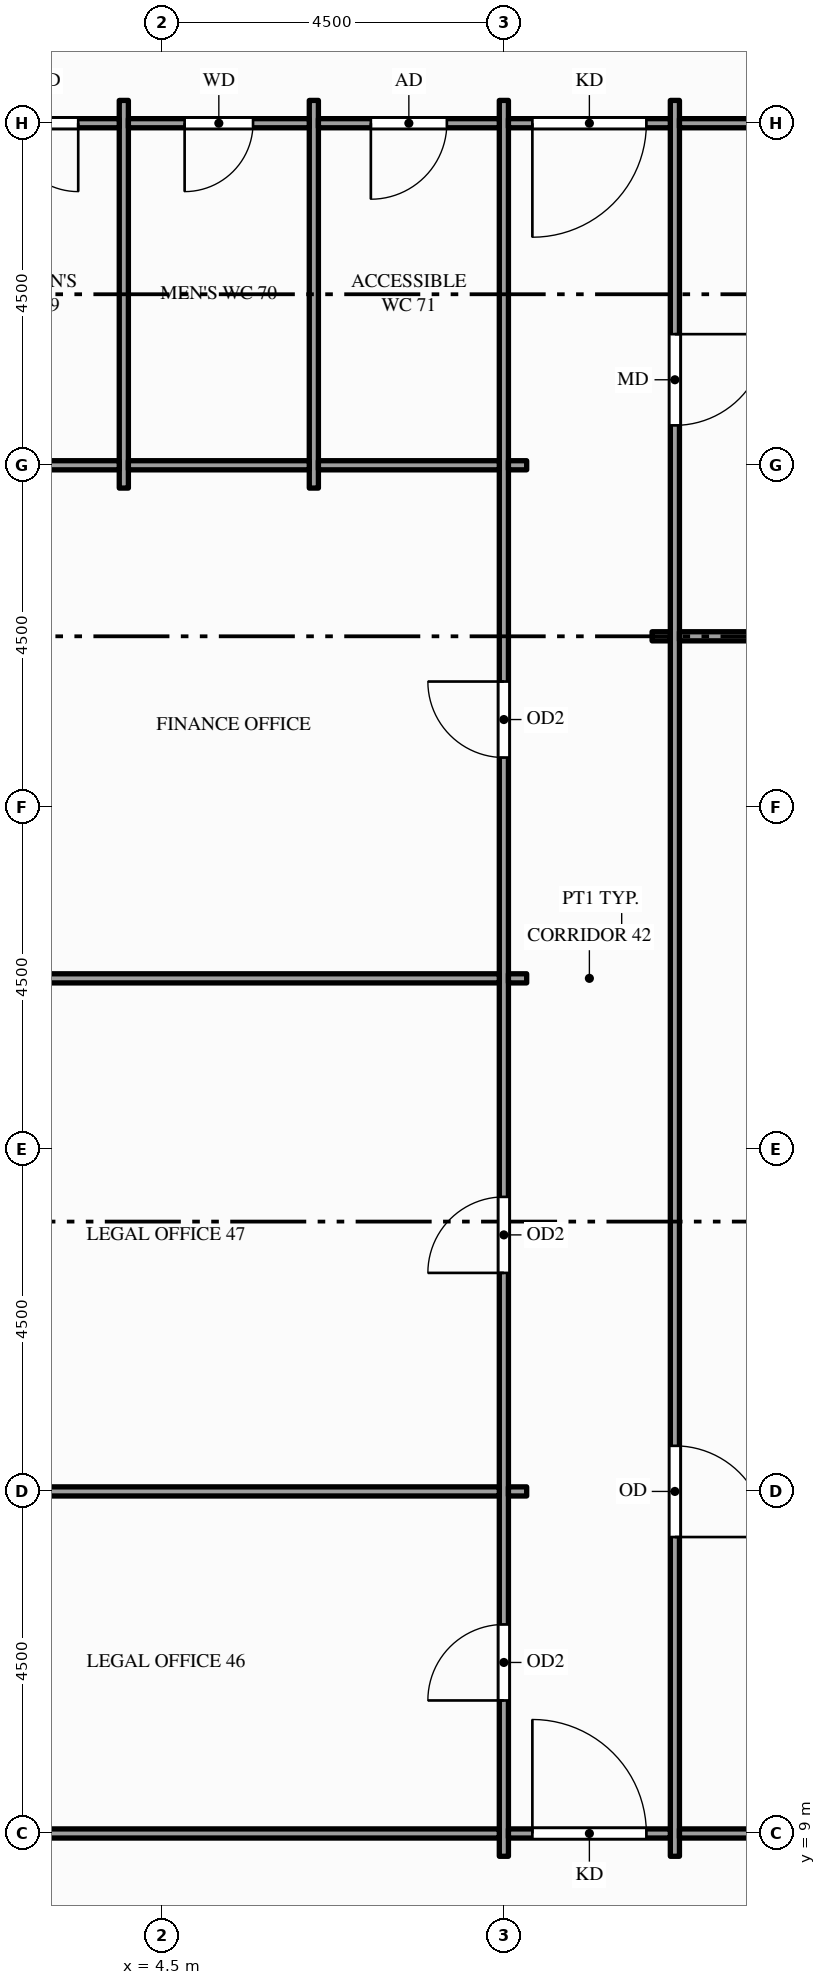
"""IFC4 building model, lengths in metres.
Left out: names, types, materials, properties, quantities, classifications, styles, units other than length and angle.
Written with IfcOpenShell. Run it as: python <this file> out.ifc"""

import sys

from ifc_helpers import new_model, si_unit, direction, frame, frame_2d, origin, place, context, subcontext, project, spatial, rectangle, extrude, element, fill, save


model = new_model("IFC4")
c1 = context("Model", 3, precision=1e-05, world=origin(), true_north=direction((0.0, 1.0)))
c2 = subcontext(c1, "Body", "Model", "MODEL_VIEW")
j1 = project(units=[si_unit("LENGTHUNIT", "METRE"), si_unit("PLANEANGLEUNIT", "RADIAN")], contexts=[c1])
p1 = place(None, origin())
s1 = spatial("IfcSite", under=j1, at=p1, CompositionType="ELEMENT")
p2 = place(p1, origin())
s2 = spatial("IfcBuilding", under=s1, at=p2, CompositionType="ELEMENT")
p3 = place(p2, frame((0.0, 0.0, 215.0)))
s3 = spatial("IfcBuildingStorey", under=s2, at=p3, CompositionType="ELEMENT", Elevation=215.0)
for number, where, z_axis, x_axis in (
    (1, (4.0, 26.7, 0.0), (0.0, 0.0, 1.0), (0.0, 1.0, 0.0)),
    (2, (6.5, 26.7, 0.0), (0.0, 0.0, 1.0), (0.0, 1.0, 0.0)),
):
    element("IfcWall", number, at=place(p3, frame(where, z_axis=z_axis, x_axis=x_axis)), inside=s3, PredefinedType="PARTITIONING", context=c2, shape_type="SweptSolid", body=[
        extrude(rectangle(XDim=5.1, YDim=0.12, at=frame_2d((2.55, 0.0))), origin(), (0.0, 0.0, 1.0), 3.85),
    ])
p4 = place(p3, frame((9.0, 8.7, 0.0), z_axis=(0.0, 0.0, 1.0), x_axis=(0.0, 1.0, 0.0)))
e3 = element("IfcWall", 3, at=p4, inside=s3, PredefinedType="PARTITIONING", context=c2, shape_type="SweptSolid", body=[
    extrude(rectangle(XDim=23.1, YDim=0.12, at=frame_2d((11.55, 0.0))), origin(), (0.0, 0.0, 1.0), 2.6),
])
p5 = place(p4, frame((2.05, 0.0, 0.0)))
e4 = element("IfcOpeningElement", 4, at=p5, cuts=e3, PredefinedType="OPENING", context=c2, shape_type="SweptSolid", body=[
    extrude(rectangle(XDim=1.0, YDim=2.1, at=frame_2d((0.5, 1.05))), frame((0.0, 0.07, 0.0), z_axis=(0.0, -1.0, 0.0), x_axis=(1.0, 0.0, 0.0)), (0.0, 0.0, 1.0), 0.14),
])
p6 = place(p4, frame((7.675, 0.0, 0.0)))
e5 = element("IfcOpeningElement", 5, at=p6, cuts=e3, PredefinedType="OPENING", context=c2, shape_type="SweptSolid", body=[
    extrude(rectangle(XDim=1.0, YDim=2.1, at=frame_2d((0.5, 1.05))), frame((0.0, 0.07, 0.0), z_axis=(0.0, -1.0, 0.0), x_axis=(1.0, 0.0, 0.0)), (0.0, 0.0, 1.0), 0.14),
])
p7 = place(p4, frame((14.455, 0.0, 0.0)))
e6 = element("IfcOpeningElement", 6, at=p7, cuts=e3, PredefinedType="OPENING", context=c2, shape_type="SweptSolid", body=[
    extrude(rectangle(XDim=1.0, YDim=2.1, at=frame_2d((0.5, 1.05))), frame((0.0, 0.07, 0.0), z_axis=(0.0, -1.0, 0.0), x_axis=(1.0, 0.0, 0.0)), (0.0, 0.0, 1.0), 0.14),
])
p8 = place(p3, frame((11.25, 8.7, 0.0), z_axis=(0.0, 0.0, 1.0), x_axis=(0.0, 1.0, 0.0)))
e7 = element("IfcWall", 7, at=p8, inside=s3, PredefinedType="PARTITIONING", context=c2, shape_type="SweptSolid", body=[
    extrude(rectangle(XDim=23.1, YDim=0.12, at=frame_2d((11.55, 0.0))), origin(), (0.0, 0.0, 1.0), 2.6),
])
p9 = place(p8, frame((18.825, 0.0, 0.0)))
e8 = element("IfcOpeningElement", 8, at=p9, cuts=e7, PredefinedType="OPENING", context=c2, shape_type="SweptSolid", body=[
    extrude(rectangle(XDim=1.2, YDim=2.1, at=frame_2d((0.6, 1.05))), frame((0.0, 0.07, 0.0), z_axis=(0.0, -1.0, 0.0), x_axis=(1.0, 0.0, 0.0)), (0.0, 0.0, 1.0), 0.14),
])
p10 = place(p8, frame((4.2, 0.0, 0.0)))
e9 = element("IfcOpeningElement", 9, at=p10, cuts=e7, PredefinedType="OPENING", context=c2, shape_type="SweptSolid", body=[
    extrude(rectangle(XDim=1.2, YDim=2.1, at=frame_2d((0.6, 1.05))), frame((0.0, 0.07, 0.0), z_axis=(0.0, -1.0, 0.0), x_axis=(1.0, 0.0, 0.0)), (0.0, 0.0, 1.0), 0.14),
])
p11 = place(p3, frame((0.15, 9.0, 0.0), z_axis=(0.0, 0.0, 1.0), x_axis=(1.0, 0.0, 0.0)))
e10 = element("IfcWall", 10, at=p11, inside=s3, PredefinedType="PARTITIONING", context=c2, shape_type="SweptSolid", body=[
    extrude(rectangle(XDim=8.79, YDim=0.12, at=frame_2d((4.395, 0.0))), origin(), (0.0, 0.0, 1.0), 2.87),
])
p12 = place(p3, frame((9.06, 9.0, 0.0), z_axis=(0.0, 0.0, 1.0), x_axis=(1.0, 0.0, 0.0)))
e11 = element("IfcWall", 11, at=p12, inside=s3, PredefinedType="PARTITIONING", context=c2, shape_type="SweptSolid", body=[
    extrude(rectangle(XDim=2.13, YDim=0.12, at=frame_2d((1.065, 0.0))), origin(), (0.0, 0.0, 1.0), 2.87),
])
p13 = place(p12, frame((0.315, 0.0, 0.0)))
e12 = element("IfcOpeningElement", 12, at=p13, cuts=e11, PredefinedType="OPENING", context=c2, shape_type="SweptSolid", body=[
    extrude(rectangle(XDim=1.5, YDim=2.1, at=frame_2d((0.75, 1.05))), frame((0.0, 0.07, 0.0), z_axis=(0.0, -1.0, 0.0), x_axis=(1.0, 0.0, 0.0)), (0.0, 0.0, 1.0), 0.14),
])
p14 = place(p3, frame((11.31, 9.0, 0.0), z_axis=(0.0, 0.0, 1.0), x_axis=(1.0, 0.0, 0.0)))
e13 = element("IfcWall", 13, at=p14, inside=s3, PredefinedType="PARTITIONING", context=c2, shape_type="SweptSolid", body=[
    extrude(rectangle(XDim=13.38, YDim=0.12, at=frame_2d((6.69, 0.0))), origin(), (0.0, 0.0, 1.0), 2.76),
])
p15 = place(p14, frame((3.54, 0.0, 0.0)))
e14 = element("IfcOpeningElement", 14, at=p15, cuts=e13, PredefinedType="OPENING", context=c2, shape_type="SweptSolid", body=[
    extrude(rectangle(XDim=1.8, YDim=2.1, at=frame_2d((0.9, 1.05))), frame((0.0, 0.07, 0.0), z_axis=(0.0, -1.0, 0.0), x_axis=(1.0, 0.0, 0.0)), (0.0, 0.0, 1.0), 0.14),
])
p16 = place(p3, frame((0.15, 13.5, 0.0), z_axis=(0.0, 0.0, 1.0), x_axis=(1.0, 0.0, 0.0)))
e15 = element("IfcWall", 15, at=p16, inside=s3, PredefinedType="PARTITIONING", context=c2, shape_type="SweptSolid", body=[
    extrude(rectangle(XDim=8.79, YDim=0.12, at=frame_2d((4.395, 0.0))), origin(), (0.0, 0.0, 1.0), 2.87),
])
p17 = place(p3, frame((9.06, 13.5, 0.0), z_axis=(0.0, 0.0, 1.0), x_axis=(1.0, 0.0, 0.0)))
e16 = element("IfcWall", 16, at=p17, inside=s3, PredefinedType="PARTITIONING", context=c2, shape_type="SweptSolid", body=[
    extrude(rectangle(XDim=0.24, YDim=0.12, at=frame_2d((0.12, 0.0))), origin(), (0.0, 0.0, 1.0), 2.87),
])
p18 = place(p3, frame((0.15, 20.25, 0.0), z_axis=(0.0, 0.0, 1.0), x_axis=(1.0, 0.0, 0.0)))
e17 = element("IfcWall", 17, at=p18, inside=s3, PredefinedType="PARTITIONING", context=c2, shape_type="SweptSolid", body=[
    extrude(rectangle(XDim=8.79, YDim=0.12, at=frame_2d((4.395, 0.0))), origin(), (0.0, 0.0, 1.0), 2.87),
])
for number, where, z_axis, x_axis in (
    (18, (9.06, 20.25, 0.0), (0.0, 0.0, 1.0), (1.0, 0.0, 0.0)),
    (19, (10.95, 24.75, 0.0), (0.0, 0.0, 1.0), (1.0, 0.0, 0.0)),
):
    element("IfcWall", number, at=place(p3, frame(where, z_axis=z_axis, x_axis=x_axis)), inside=s3, PredefinedType="PARTITIONING", context=c2, shape_type="SweptSolid", body=[
        extrude(rectangle(XDim=0.24, YDim=0.12, at=frame_2d((0.12, 0.0))), origin(), (0.0, 0.0, 1.0), 2.87),
    ])
p19 = place(p3, frame((11.31, 24.75, 0.0), z_axis=(0.0, 0.0, 1.0), x_axis=(1.0, 0.0, 0.0)))
e20 = element("IfcWall", 20, at=p19, inside=s3, PredefinedType="PARTITIONING", context=c2, shape_type="SweptSolid", body=[
    extrude(rectangle(XDim=12.637, YDim=0.12, at=frame_2d((6.319, 0.0))), origin(), (0.0, 0.0, 1.0), 2.87),
])
p20 = place(p3, frame((1.65, 27.0, 0.0), z_axis=(0.0, 0.0, 1.0), x_axis=(1.0, 0.0, 0.0)))
e21 = element("IfcWall", 21, at=p20, inside=s3, PredefinedType="PARTITIONING", context=c2, shape_type="SweptSolid", body=[
    extrude(rectangle(XDim=2.29, YDim=0.12, at=frame_2d((1.145, 0.0))), origin(), (0.0, 0.0, 1.0), 2.87),
])
for number, where, z_axis, x_axis in (
    (22, (4.06, 27.0, 0.0), (0.0, 0.0, 1.0), (1.0, 0.0, 0.0)),
    (23, (6.56, 27.0, 0.0), (0.0, 0.0, 1.0), (1.0, 0.0, 0.0)),
):
    element("IfcWall", number, at=place(p3, frame(where, z_axis=z_axis, x_axis=x_axis)), inside=s3, PredefinedType="PARTITIONING", context=c2, shape_type="SweptSolid", body=[
        extrude(rectangle(XDim=2.38, YDim=0.12, at=frame_2d((1.19, 0.0))), origin(), (0.0, 0.0, 1.0), 2.87),
    ])
p21 = place(p3, frame((9.06, 27.0, 0.0), z_axis=(0.0, 0.0, 1.0), x_axis=(1.0, 0.0, 0.0)))
e24 = element("IfcWall", 24, at=p21, inside=s3, PredefinedType="PARTITIONING", context=c2, shape_type="SweptSolid", body=[
    extrude(rectangle(XDim=0.24, YDim=0.12, at=frame_2d((0.12, 0.0))), origin(), (0.0, 0.0, 1.0), 2.87),
])
p22 = place(p3, frame((1.65, 31.5, 0.0), z_axis=(0.0, 0.0, 1.0), x_axis=(1.0, 0.0, 0.0)))
e25 = element("IfcWall", 25, at=p22, inside=s3, PredefinedType="PARTITIONING", context=c2, shape_type="SweptSolid", body=[
    extrude(rectangle(XDim=2.29, YDim=0.12, at=frame_2d((1.145, 0.0))), origin(), (0.0, 0.0, 1.0), 2.87),
])
p23 = place(p22, frame((0.85, 0.0, 0.0)))
e26 = element("IfcOpeningElement", 26, at=p23, cuts=e25, PredefinedType="OPENING", context=c2, shape_type="SweptSolid", body=[
    extrude(rectangle(XDim=0.9, YDim=2.1, at=frame_2d((0.45, 1.05))), frame((0.0, 0.07, 0.0), z_axis=(0.0, -1.0, 0.0), x_axis=(1.0, 0.0, 0.0)), (0.0, 0.0, 1.0), 0.14),
])
p24 = place(p3, frame((4.06, 31.5, 0.0), z_axis=(0.0, 0.0, 1.0), x_axis=(1.0, 0.0, 0.0)))
e27 = element("IfcWall", 27, at=p24, inside=s3, PredefinedType="PARTITIONING", context=c2, shape_type="SweptSolid", body=[
    extrude(rectangle(XDim=2.38, YDim=0.12, at=frame_2d((1.19, 0.0))), origin(), (0.0, 0.0, 1.0), 2.87),
])
p25 = place(p24, frame((0.74, 0.0, 0.0)))
e28 = element("IfcOpeningElement", 28, at=p25, cuts=e27, PredefinedType="OPENING", context=c2, shape_type="SweptSolid", body=[
    extrude(rectangle(XDim=0.9, YDim=2.1, at=frame_2d((0.45, 1.05))), frame((0.0, 0.07, 0.0), z_axis=(0.0, -1.0, 0.0), x_axis=(1.0, 0.0, 0.0)), (0.0, 0.0, 1.0), 0.14),
])
p26 = place(p3, frame((6.56, 31.5, 0.0), z_axis=(0.0, 0.0, 1.0), x_axis=(1.0, 0.0, 0.0)))
e29 = element("IfcWall", 29, at=p26, inside=s3, PredefinedType="PARTITIONING", context=c2, shape_type="SweptSolid", body=[
    extrude(rectangle(XDim=2.38, YDim=0.12, at=frame_2d((1.19, 0.0))), origin(), (0.0, 0.0, 1.0), 2.87),
])
p27 = place(p26, frame((0.69, 0.0, 0.0)))
e30 = element("IfcOpeningElement", 30, at=p27, cuts=e29, PredefinedType="OPENING", context=c2, shape_type="SweptSolid", body=[
    extrude(rectangle(XDim=1.0, YDim=2.1, at=frame_2d((0.5, 1.05))), frame((0.0, 0.07, 0.0), z_axis=(0.0, -1.0, 0.0), x_axis=(1.0, 0.0, 0.0)), (0.0, 0.0, 1.0), 0.14),
])
p28 = place(p3, frame((9.06, 31.5, 0.0), z_axis=(0.0, 0.0, 1.0), x_axis=(1.0, 0.0, 0.0)))
e31 = element("IfcWall", 31, at=p28, inside=s3, PredefinedType="PARTITIONING", context=c2, shape_type="SweptSolid", body=[
    extrude(rectangle(XDim=2.13, YDim=0.12, at=frame_2d((1.065, 0.0))), origin(), (0.0, 0.0, 1.0), 2.87),
])
p29 = place(p28, frame((0.315, 0.0, 0.0)))
e32 = element("IfcOpeningElement", 32, at=p29, cuts=e31, PredefinedType="OPENING", context=c2, shape_type="SweptSolid", body=[
    extrude(rectangle(XDim=1.5, YDim=2.1, at=frame_2d((0.75, 1.05))), frame((0.0, 0.07, 0.0), z_axis=(0.0, -1.0, 0.0), x_axis=(1.0, 0.0, 0.0)), (0.0, 0.0, 1.0), 0.14),
])
p30 = place(p3, frame((11.31, 31.5, 0.0), z_axis=(0.0, 0.0, 1.0), x_axis=(1.0, 0.0, 0.0)))
e33 = element("IfcWall", 33, at=p30, inside=s3, PredefinedType="PARTITIONING", context=c2, shape_type="SweptSolid", body=[
    extrude(rectangle(XDim=12.54, YDim=0.12, at=frame_2d((6.27, 0.0))), origin(), (0.0, 0.0, 1.0), 2.87),
])
p31 = place(p13, origin())
e34 = element("IfcDoor", 34, at=p31, inside=s3, OperationType="SINGLE_SWING_LEFT", PredefinedType="DOOR", context=c2, shape_type="SweptSolid", body=[
    extrude(rectangle(XDim=1.5, YDim=2.1, at=frame_2d((0.75, 1.05))), frame((0.0, 0.025, 0.0), z_axis=(0.0, -1.0, 0.0), x_axis=(1.0, 0.0, 0.0)), (0.0, 0.0, 1.0), 0.05),
])
fill(e12, e34)
p32 = place(p29, origin())
e35 = element("IfcDoor", 35, at=p32, inside=s3, OperationType="SINGLE_SWING_LEFT", PredefinedType="DOOR", context=c2, shape_type="SweptSolid", body=[
    extrude(rectangle(XDim=1.5, YDim=2.1, at=frame_2d((0.75, 1.05))), frame((0.0, 0.025, 0.0), z_axis=(0.0, -1.0, 0.0), x_axis=(1.0, 0.0, 0.0)), (0.0, 0.0, 1.0), 0.05),
])
fill(e32, e35)
p33 = place(p5, origin())
e36 = element("IfcDoor", 36, at=p33, inside=s3, OperationType="SINGLE_SWING_LEFT", PredefinedType="DOOR", context=c2, shape_type="SweptSolid", body=[
    extrude(rectangle(XDim=1.0, YDim=2.1, at=frame_2d((0.5, 1.05))), frame((0.0, 0.025, 0.0), z_axis=(0.0, -1.0, 0.0), x_axis=(1.0, 0.0, 0.0)), (0.0, 0.0, 1.0), 0.05),
])
fill(e4, e36)
p34 = place(p6, origin())
e37 = element("IfcDoor", 37, at=p34, inside=s3, OperationType="SINGLE_SWING_LEFT", PredefinedType="DOOR", context=c2, shape_type="SweptSolid", body=[
    extrude(rectangle(XDim=1.0, YDim=2.1, at=frame_2d((0.5, 1.05))), frame((0.0, 0.025, 0.0), z_axis=(0.0, -1.0, 0.0), x_axis=(1.0, 0.0, 0.0)), (0.0, 0.0, 1.0), 0.05),
])
fill(e5, e37)
p35 = place(p7, origin())
e38 = element("IfcDoor", 38, at=p35, inside=s3, OperationType="SINGLE_SWING_RIGHT", PredefinedType="DOOR", context=c2, shape_type="SweptSolid", body=[
    extrude(rectangle(XDim=1.0, YDim=2.1, at=frame_2d((0.5, 1.05))), frame((0.0, 0.025, 0.0), z_axis=(0.0, -1.0, 0.0), x_axis=(1.0, 0.0, 0.0)), (0.0, 0.0, 1.0), 0.05),
])
fill(e6, e38)
p36 = place(p23, origin())
e39 = element("IfcDoor", 39, at=p36, inside=s3, OperationType="SINGLE_SWING_RIGHT", PredefinedType="DOOR", context=c2, shape_type="SweptSolid", body=[
    extrude(rectangle(XDim=0.9, YDim=2.1, at=frame_2d((0.45, 1.05))), frame((0.0, 0.025, 0.0), z_axis=(0.0, -1.0, 0.0), x_axis=(1.0, 0.0, 0.0)), (0.0, 0.0, 1.0), 0.05),
])
fill(e26, e39)
p37 = place(p25, origin())
e40 = element("IfcDoor", 40, at=p37, inside=s3, OperationType="SINGLE_SWING_LEFT", PredefinedType="DOOR", context=c2, shape_type="SweptSolid", body=[
    extrude(rectangle(XDim=0.9, YDim=2.1, at=frame_2d((0.45, 1.05))), frame((0.0, 0.025, 0.0), z_axis=(0.0, -1.0, 0.0), x_axis=(1.0, 0.0, 0.0)), (0.0, 0.0, 1.0), 0.05),
])
fill(e28, e40)
p38 = place(p27, origin())
e41 = element("IfcDoor", 41, at=p38, inside=s3, OperationType="SINGLE_SWING_LEFT", PredefinedType="DOOR", context=c2, shape_type="SweptSolid", body=[
    extrude(rectangle(XDim=1.0, YDim=2.1, at=frame_2d((0.5, 1.05))), frame((0.0, 0.025, 0.0), z_axis=(0.0, -1.0, 0.0), x_axis=(1.0, 0.0, 0.0)), (0.0, 0.0, 1.0), 0.05),
])
fill(e30, e41)
p39 = place(p9, origin())
e42 = element("IfcDoor", 42, at=p39, inside=s3, OperationType="SINGLE_SWING_RIGHT", PredefinedType="DOOR", context=c2, shape_type="SweptSolid", body=[
    extrude(rectangle(XDim=1.2, YDim=2.1, at=frame_2d((0.6, 1.05))), frame((0.0, 0.025, 0.0), z_axis=(0.0, -1.0, 0.0), x_axis=(1.0, 0.0, 0.0)), (0.0, 0.0, 1.0), 0.05),
])
fill(e8, e42)
p40 = place(p10, origin())
e43 = element("IfcDoor", 43, at=p40, inside=s3, OperationType="SINGLE_SWING_LEFT", PredefinedType="DOOR", context=c2, shape_type="SweptSolid", body=[
    extrude(rectangle(XDim=1.2, YDim=2.1, at=frame_2d((0.6, 1.05))), frame((0.0, 0.025, 0.0), z_axis=(0.0, -1.0, 0.0), x_axis=(1.0, 0.0, 0.0)), (0.0, 0.0, 1.0), 0.05),
])
fill(e9, e43)
save(model, sys.argv[1])
